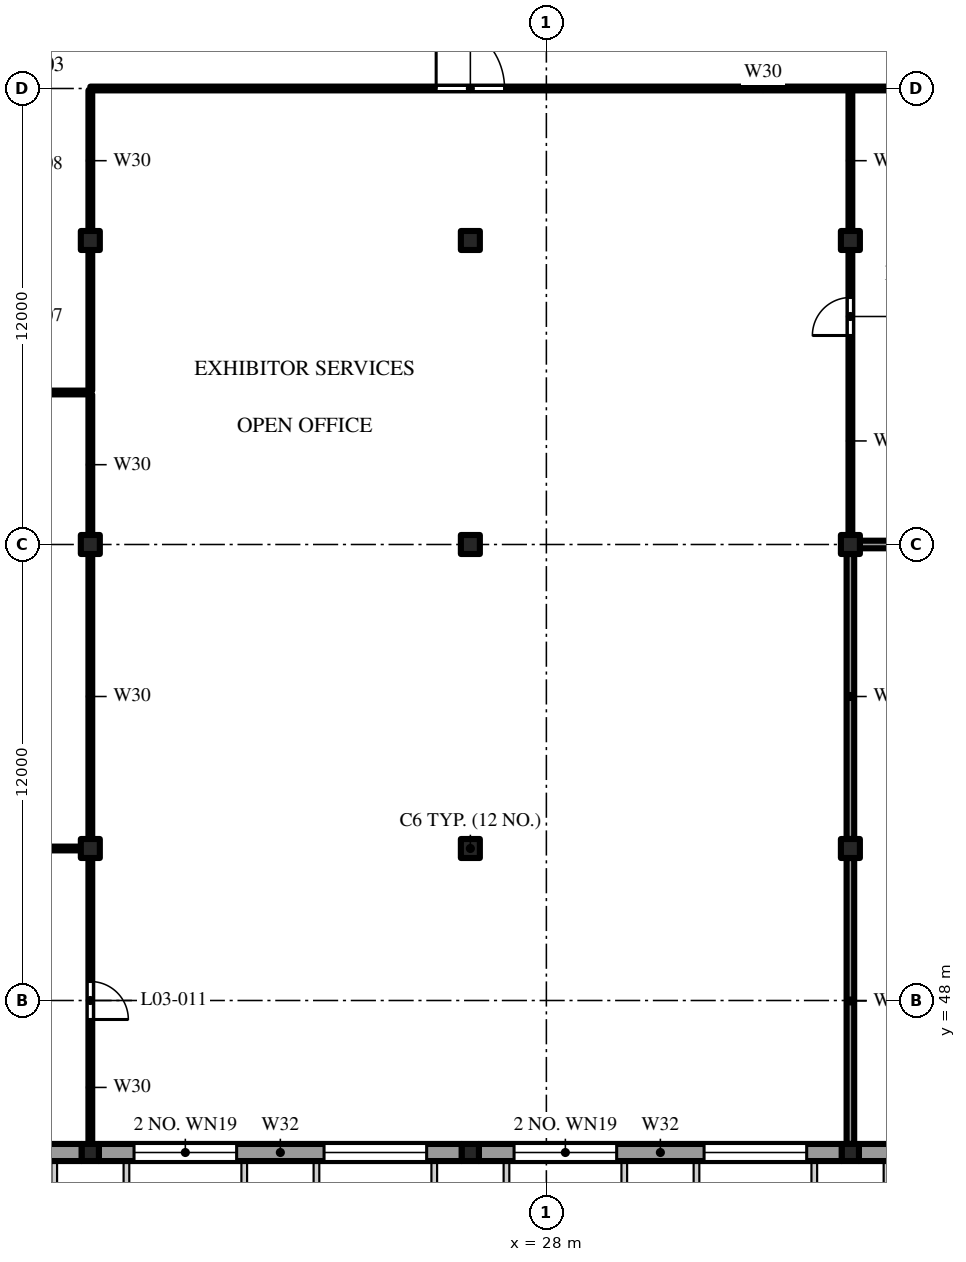
"""IFC4 building model, lengths in metres.
Left out: names, types, materials, properties, quantities, classifications, styles, units other than length and angle.
Written with IfcOpenShell. Run it as: python <this file> out.ifc"""

import sys

from ifc_helpers import new_model, si_unit, direction, frame, frame_2d, origin, origin_2d, place, context, subcontext, project, spatial, polyline, rectangle, outline, extrude, element, fill, save


model = new_model("IFC4")
c1 = context("Model", 3, precision=1e-05, world=origin(), true_north=direction((0.0, 1.0)))
c2 = subcontext(c1, "Body", "Model", "MODEL_VIEW")
j1 = project(units=[si_unit("LENGTHUNIT", "METRE"), si_unit("PLANEANGLEUNIT", "RADIAN")], contexts=[c1])
p1 = place(None, origin())
s1 = spatial("IfcSite", under=j1, at=p1, CompositionType="ELEMENT")
p2 = place(p1, origin())
s2 = spatial("IfcBuilding", under=s1, at=p2, CompositionType="ELEMENT")
p3 = place(p2, frame((0.0, 0.0, 16.8)))
s3 = spatial("IfcBuildingStorey", under=s2, at=p3, CompositionType="ELEMENT", Elevation=16.8)
p4 = place(p3, frame((16.0, 44.0, 0.0), z_axis=(0.0, 0.0, 1.0), x_axis=(1.0, 0.0, 0.0)))
e1 = element("IfcColumn", 1, at=p4, inside=s3, PredefinedType="COLUMN", context=c2, shape_type="SweptSolid", body=[
    extrude(rectangle(XDim=0.45, YDim=0.45, at=origin_2d()), origin(), (0.0, 0.0, 1.0), 3.691),
])
for number, where, z_axis, x_axis in (
    (2, (16.0, 52.0, 0.0), (0.0, 0.0, 1.0), (1.0, 0.0, 0.0)),
    (3, (16.0, 60.0, 0.0), (0.0, 0.0, 1.0), (1.0, 0.0, 0.0)),
    (4, (16.0, 68.0, 0.0), (0.0, 0.0, 1.0), (1.0, 0.0, 0.0)),
):
    element("IfcColumn", number, at=place(p3, frame(where, z_axis=z_axis, x_axis=x_axis)), inside=s3, PredefinedType="COLUMN", context=c2, shape_type="SweptSolid", body=[
        extrude(rectangle(XDim=0.5, YDim=0.5, at=origin_2d()), origin(), (0.0, 0.0, 1.0), 4.8),
    ])
p5 = place(p3, frame((26.0, 44.0, 0.0), z_axis=(0.0, 0.0, 1.0), x_axis=(1.0, 0.0, 0.0)))
e5 = element("IfcColumn", 5, at=p5, inside=s3, PredefinedType="COLUMN", context=c2, shape_type="SweptSolid", body=[
    extrude(rectangle(XDim=0.45, YDim=0.45, at=origin_2d()), origin(), (0.0, 0.0, 1.0), 3.691),
])
for number, where, z_axis, x_axis in (
    (6, (26.0, 52.0, 0.0), (0.0, 0.0, 1.0), (1.0, 0.0, 0.0)),
    (7, (26.0, 60.0, 0.0), (0.0, 0.0, 1.0), (1.0, 0.0, 0.0)),
    (8, (26.0, 68.0, 0.0), (0.0, 0.0, 1.0), (1.0, 0.0, 0.0)),
):
    element("IfcColumn", number, at=place(p3, frame(where, z_axis=z_axis, x_axis=x_axis)), inside=s3, PredefinedType="COLUMN", context=c2, shape_type="SweptSolid", body=[
        extrude(rectangle(XDim=0.5, YDim=0.5, at=origin_2d()), origin(), (0.0, 0.0, 1.0), 4.8),
    ])
p6 = place(p3, frame((36.0, 44.0, 0.0), z_axis=(0.0, 0.0, 1.0), x_axis=(1.0, 0.0, 0.0)))
e9 = element("IfcColumn", 9, at=p6, inside=s3, PredefinedType="COLUMN", context=c2, shape_type="SweptSolid", body=[
    extrude(rectangle(XDim=0.45, YDim=0.45, at=origin_2d()), origin(), (0.0, 0.0, 1.0), 3.691),
])
for number, where, z_axis, x_axis in (
    (10, (36.0, 52.0, 0.0), (0.0, 0.0, 1.0), (1.0, 0.0, 0.0)),
    (11, (36.0, 60.0, 0.0), (0.0, 0.0, 1.0), (1.0, 0.0, 0.0)),
    (12, (36.0, 68.0, 0.0), (0.0, 0.0, 1.0), (1.0, 0.0, 0.0)),
):
    element("IfcColumn", number, at=place(p3, frame(where, z_axis=z_axis, x_axis=x_axis)), inside=s3, PredefinedType="COLUMN", context=c2, shape_type="SweptSolid", body=[
        extrude(rectangle(XDim=0.5, YDim=0.5, at=origin_2d()), origin(), (0.0, 0.0, 1.0), 4.8),
    ])
p7 = place(p3, frame((6.225, 44.0, 0.0), z_axis=(0.0, 0.0, 1.0), x_axis=(1.0, 0.0, 0.0)))
e13 = element("IfcWall", 13, at=p7, inside=s3, PredefinedType="SOLIDWALL", context=c2, shape_type="SweptSolid", body=[
    extrude(rectangle(XDim=9.55, YDim=0.45, at=frame_2d((4.775, 0.0))), origin(), (0.0, 0.0, 1.0), 3.541),
])
p8 = place(p7, frame((0.925, 0.0, 0.8)))
e14 = element("IfcOpeningElement", 14, at=p8, cuts=e13, PredefinedType="OPENING", context=c2, shape_type="SweptSolid", body=[
    extrude(rectangle(XDim=2.7, YDim=2.4, at=frame_2d((1.35, 1.2))), frame((0.0, 0.235, 0.0), z_axis=(0.0, -1.0, 0.0), x_axis=(1.0, 0.0, 0.0)), (0.0, 0.0, 1.0), 0.47),
])
p9 = place(p7, frame((5.925, 0.0, 0.8)))
e15 = element("IfcOpeningElement", 15, at=p9, cuts=e13, PredefinedType="OPENING", context=c2, shape_type="SweptSolid", body=[
    extrude(rectangle(XDim=2.7, YDim=2.4, at=frame_2d((1.35, 1.2))), frame((0.0, 0.235, 0.0), z_axis=(0.0, -1.0, 0.0), x_axis=(1.0, 0.0, 0.0)), (0.0, 0.0, 1.0), 0.47),
])
p10 = place(p3, frame((16.225, 44.0, 0.0), z_axis=(0.0, 0.0, 1.0), x_axis=(1.0, 0.0, 0.0)))
e16 = element("IfcWall", 16, at=p10, inside=s3, PredefinedType="SOLIDWALL", context=c2, shape_type="SweptSolid", body=[
    extrude(rectangle(XDim=9.55, YDim=0.45, at=frame_2d((4.775, 0.0))), origin(), (0.0, 0.0, 1.0), 3.541),
])
p11 = place(p10, frame((0.925, 0.0, 0.8)))
e17 = element("IfcOpeningElement", 17, at=p11, cuts=e16, PredefinedType="OPENING", context=c2, shape_type="SweptSolid", body=[
    extrude(rectangle(XDim=2.7, YDim=2.4, at=frame_2d((1.35, 1.2))), frame((0.0, 0.235, 0.0), z_axis=(0.0, -1.0, 0.0), x_axis=(1.0, 0.0, 0.0)), (0.0, 0.0, 1.0), 0.47),
])
p12 = place(p10, frame((5.925, 0.0, 0.8)))
e18 = element("IfcOpeningElement", 18, at=p12, cuts=e16, PredefinedType="OPENING", context=c2, shape_type="SweptSolid", body=[
    extrude(rectangle(XDim=2.7, YDim=2.4, at=frame_2d((1.35, 1.2))), frame((0.0, 0.235, 0.0), z_axis=(0.0, -1.0, 0.0), x_axis=(1.0, 0.0, 0.0)), (0.0, 0.0, 1.0), 0.47),
])
p13 = place(p3, frame((26.225, 44.0, 0.0), z_axis=(0.0, 0.0, 1.0), x_axis=(1.0, 0.0, 0.0)))
e19 = element("IfcWall", 19, at=p13, inside=s3, PredefinedType="SOLIDWALL", context=c2, shape_type="SweptSolid", body=[
    extrude(rectangle(XDim=9.55, YDim=0.45, at=frame_2d((4.775, 0.0))), origin(), (0.0, 0.0, 1.0), 3.541),
])
p14 = place(p13, frame((0.925, 0.0, 0.8)))
e20 = element("IfcOpeningElement", 20, at=p14, cuts=e19, PredefinedType="OPENING", context=c2, shape_type="SweptSolid", body=[
    extrude(rectangle(XDim=2.7, YDim=2.4, at=frame_2d((1.35, 1.2))), frame((0.0, 0.235, 0.0), z_axis=(0.0, -1.0, 0.0), x_axis=(1.0, 0.0, 0.0)), (0.0, 0.0, 1.0), 0.47),
])
p15 = place(p13, frame((5.925, 0.0, 0.8)))
e21 = element("IfcOpeningElement", 21, at=p15, cuts=e19, PredefinedType="OPENING", context=c2, shape_type="SweptSolid", body=[
    extrude(rectangle(XDim=2.7, YDim=2.4, at=frame_2d((1.35, 1.2))), frame((0.0, 0.235, 0.0), z_axis=(0.0, -1.0, 0.0), x_axis=(1.0, 0.0, 0.0)), (0.0, 0.0, 1.0), 0.47),
])
p16 = place(p3, frame((36.225, 44.0, 0.0), z_axis=(0.0, 0.0, 1.0), x_axis=(1.0, 0.0, 0.0)))
e22 = element("IfcWall", 22, at=p16, inside=s3, PredefinedType="SOLIDWALL", context=c2, shape_type="SweptSolid", body=[
    extrude(rectangle(XDim=9.55, YDim=0.45, at=frame_2d((4.775, 0.0))), origin(), (0.0, 0.0, 1.0), 3.541),
])
p17 = place(p16, frame((0.925, 0.0, 0.8)))
e23 = element("IfcOpeningElement", 23, at=p17, cuts=e22, PredefinedType="OPENING", context=c2, shape_type="SweptSolid", body=[
    extrude(rectangle(XDim=2.7, YDim=2.4, at=frame_2d((1.35, 1.2))), frame((0.0, 0.235, 0.0), z_axis=(0.0, -1.0, 0.0), x_axis=(1.0, 0.0, 0.0)), (0.0, 0.0, 1.0), 0.47),
])
p18 = place(p16, frame((5.925, 0.0, 0.8)))
e24 = element("IfcOpeningElement", 24, at=p18, cuts=e22, PredefinedType="OPENING", context=c2, shape_type="SweptSolid", body=[
    extrude(rectangle(XDim=2.7, YDim=2.4, at=frame_2d((1.35, 1.2))), frame((0.0, 0.235, 0.0), z_axis=(0.0, -1.0, 0.0), x_axis=(1.0, 0.0, 0.0)), (0.0, 0.0, 1.0), 0.47),
])
p19 = place(p3, frame((6.225, 52.0, 0.0), z_axis=(0.0, 0.0, 1.0), x_axis=(1.0, 0.0, 0.0)))
e25 = element("IfcWall", 25, at=p19, inside=s3, PredefinedType="PARTITIONING", context=c2, shape_type="SweptSolid", body=[
    extrude(rectangle(XDim=9.525, YDim=0.1, at=frame_2d((4.762, 0.0))), origin(), (0.0, 0.0, 1.0), 5.241),
])
p20 = place(p3, frame((36.25, 60.0, 0.0), z_axis=(0.0, 0.0, 1.0), x_axis=(1.0, 0.0, 0.0)))
e26 = element("IfcWall", 26, at=p20, inside=s3, PredefinedType="SOLIDWALL", context=c2, shape_type="SweptSolid", body=[
    extrude(rectangle(XDim=9.525, YDim=0.2, at=frame_2d((4.762, 0.0))), origin(), (0.0, 0.0, 1.0), 6.942),
])
p21 = place(p20, frame((4.25, 0.0, 0.0)))
e27 = element("IfcOpeningElement", 27, at=p21, cuts=e26, PredefinedType="OPENING", context=c2, shape_type="SweptSolid", body=[
    extrude(rectangle(XDim=1.0, YDim=2.1, at=frame_2d((0.5, 1.05))), frame((0.0, 0.11, 0.0), z_axis=(0.0, -1.0, 0.0), x_axis=(1.0, 0.0, 0.0)), (0.0, 0.0, 1.0), 0.22),
])
p22 = place(p3, frame((12.2, 64.0, 0.0), z_axis=(0.0, 0.0, 1.0), x_axis=(1.0, 0.0, 0.0)))
e28 = element("IfcWall", 28, at=p22, inside=s3, PredefinedType="PARTITIONING", context=c2, shape_type="SweptSolid", body=[
    extrude(rectangle(XDim=3.8, YDim=0.1, at=frame_2d((1.9, 0.0))), origin(), (0.0, 0.0, 1.0), 7.792),
])
p23 = place(p22, frame((1.4, 0.0, 0.0)))
e29 = element("IfcOpeningElement", 29, at=p23, cuts=e28, PredefinedType="OPENING", context=c2, shape_type="SweptSolid", body=[
    extrude(rectangle(XDim=1.0, YDim=2.1, at=frame_2d((0.5, 1.05))), frame((0.0, 0.06, 0.0), z_axis=(0.0, -1.0, 0.0), x_axis=(1.0, 0.0, 0.0)), (0.0, 0.0, 1.0), 0.12),
])
p24 = place(p3, frame((16.0, 72.0, 0.0), z_axis=(0.0, 0.0, 1.0), x_axis=(1.0, 0.0, 0.0)))
e30 = element("IfcWall", 30, at=p24, inside=s3, PredefinedType="PARTITIONING", context=c2, shape_type="SweptSolid", body=[
    extrude(rectangle(XDim=29.775, YDim=0.1, at=frame_2d((14.887, 0.0))), origin(), (0.0, 0.0, 1.0), 9.493),
])
p25 = place(p24, frame((9.1, 0.0, 0.0)))
e31 = element("IfcOpeningElement", 31, at=p25, cuts=e30, PredefinedType="OPENING", context=c2, shape_type="SweptSolid", body=[
    extrude(rectangle(XDim=1.8, YDim=2.1, at=frame_2d((0.9, 1.05))), frame((0.0, 0.06, 0.0), z_axis=(0.0, -1.0, 0.0), x_axis=(1.0, 0.0, 0.0)), (0.0, 0.0, 1.0), 0.12),
])
p26 = place(p24, frame((24.5, 0.0, 0.0)))
e32 = element("IfcOpeningElement", 32, at=p26, cuts=e30, PredefinedType="OPENING", context=c2, shape_type="SweptSolid", body=[
    extrude(rectangle(XDim=1.0, YDim=2.1, at=frame_2d((0.5, 1.05))), frame((0.0, 0.06, 0.0), z_axis=(0.0, -1.0, 0.0), x_axis=(1.0, 0.0, 0.0)), (0.0, 0.0, 1.0), 0.12),
])
p27 = place(p3, frame((16.0, 44.225, 0.0), z_axis=(0.0, 0.0, 1.0), x_axis=(0.0, 1.0, 0.0)))
e33 = element("IfcWall", 33, at=p27, inside=s3, PredefinedType="PARTITIONING", context=c2, shape_type="SweptSolid", body=[
    extrude(outline(polyline([(0.0, 0.0), (7.525, 0.0), (7.525, 5.188), (0.0, 3.589), (0.0, 0.0)])), frame((0.0, 0.05, 0.0), z_axis=(0.0, -1.0, 0.0), x_axis=(1.0, 0.0, 0.0)), (0.0, 0.0, 1.0), 0.1),
])
p28 = place(p27, frame((3.275, 0.0, 0.0)))
e34 = element("IfcOpeningElement", 34, at=p28, cuts=e33, PredefinedType="OPENING", context=c2, shape_type="SweptSolid", body=[
    extrude(rectangle(XDim=1.0, YDim=2.1, at=frame_2d((0.5, 1.05))), frame((0.0, 0.06, 0.0), z_axis=(0.0, -1.0, 0.0), x_axis=(1.0, 0.0, 0.0)), (0.0, 0.0, 1.0), 0.12),
])
p29 = place(p3, frame((16.0, 52.25, 0.0), z_axis=(0.0, 0.0, 1.0), x_axis=(0.0, 1.0, 0.0)))
e35 = element("IfcWall", 35, at=p29, inside=s3, PredefinedType="PARTITIONING", context=c2, shape_type="SweptSolid", body=[
    extrude(outline(polyline([(0.0, 0.0), (7.5, 0.0), (7.5, 6.889), (0.0, 5.295), (0.0, 0.0)])), frame((0.0, 0.05, 0.0), z_axis=(0.0, -1.0, 0.0), x_axis=(1.0, 0.0, 0.0)), (0.0, 0.0, 1.0), 0.1),
])
p30 = place(p3, frame((16.0, 60.25, 0.0), z_axis=(0.0, 0.0, 1.0), x_axis=(0.0, 1.0, 0.0)))
e36 = element("IfcWall", 36, at=p30, inside=s3, PredefinedType="PARTITIONING", context=c2, shape_type="SweptSolid", body=[
    extrude(outline(polyline([(0.0, 0.0), (3.7, 0.0), (3.7, 7.781), (0.0, 6.995), (0.0, 0.0)])), frame((0.0, 0.05, 0.0), z_axis=(0.0, -1.0, 0.0), x_axis=(1.0, 0.0, 0.0)), (0.0, 0.0, 1.0), 0.1),
])
p31 = place(p3, frame((16.0, 64.05, 0.0), z_axis=(0.0, 0.0, 1.0), x_axis=(0.0, 1.0, 0.0)))
e37 = element("IfcWall", 37, at=p31, inside=s3, PredefinedType="PARTITIONING", context=c2, shape_type="SweptSolid", body=[
    extrude(outline(polyline([(0.0, 0.0), (3.7, 0.0), (3.7, 8.589), (0.0, 7.803), (0.0, 0.0)])), frame((0.0, 0.05, 0.0), z_axis=(0.0, -1.0, 0.0), x_axis=(1.0, 0.0, 0.0)), (0.0, 0.0, 1.0), 0.1),
])
p32 = place(p3, frame((16.0, 68.25, 0.0), z_axis=(0.0, 0.0, 1.0), x_axis=(0.0, 1.0, 0.0)))
e38 = element("IfcWall", 38, at=p32, inside=s3, PredefinedType="PARTITIONING", context=c2, shape_type="SweptSolid", body=[
    extrude(outline(polyline([(0.0, 0.0), (3.7, 0.0), (3.7, 9.482), (0.0, 8.696), (0.0, 0.0)])), frame((0.0, 0.05, 0.0), z_axis=(0.0, -1.0, 0.0), x_axis=(1.0, 0.0, 0.0)), (0.0, 0.0, 1.0), 0.1),
])
p33 = place(p3, frame((36.0, 44.225, 0.0), z_axis=(0.0, 0.0, 1.0), x_axis=(0.0, 1.0, 0.0)))
e39 = element("IfcWall", 39, at=p33, inside=s3, PredefinedType="SOLIDWALL", context=c2, shape_type="SweptSolid", body=[
    extrude(outline(polyline([(0.0, 0.0), (7.525, 0.0), (7.525, 5.188), (0.0, 3.589), (0.0, 0.0)])), frame((0.0, 0.1, 0.0), z_axis=(0.0, -1.0, 0.0), x_axis=(1.0, 0.0, 0.0)), (0.0, 0.0, 1.0), 0.2),
])
p34 = place(p3, frame((36.0, 52.25, 0.0), z_axis=(0.0, 0.0, 1.0), x_axis=(0.0, 1.0, 0.0)))
e40 = element("IfcWall", 40, at=p34, inside=s3, PredefinedType="SOLIDWALL", context=c2, shape_type="SweptSolid", body=[
    extrude(outline(polyline([(0.0, 0.0), (7.5, 0.0), (7.5, 6.889), (0.0, 5.295), (0.0, 0.0)])), frame((0.0, 0.1, 0.0), z_axis=(0.0, -1.0, 0.0), x_axis=(1.0, 0.0, 0.0)), (0.0, 0.0, 1.0), 0.2),
])
p35 = place(p3, frame((36.0, 60.25, 0.0), z_axis=(0.0, 0.0, 1.0), x_axis=(0.0, 1.0, 0.0)))
e41 = element("IfcWall", 41, at=p35, inside=s3, PredefinedType="PARTITIONING", context=c2, shape_type="SweptSolid", body=[
    extrude(outline(polyline([(0.0, 0.0), (7.5, 0.0), (7.5, 8.589), (0.0, 6.995), (0.0, 0.0)])), frame((0.0, 0.05, 0.0), z_axis=(0.0, -1.0, 0.0), x_axis=(1.0, 0.0, 0.0)), (0.0, 0.0, 1.0), 0.1),
])
p36 = place(p35, frame((5.25, 0.0, 0.0)))
e42 = element("IfcOpeningElement", 42, at=p36, cuts=e41, PredefinedType="OPENING", context=c2, shape_type="SweptSolid", body=[
    extrude(rectangle(XDim=1.0, YDim=2.1, at=frame_2d((0.5, 1.05))), frame((0.0, 0.06, 0.0), z_axis=(0.0, -1.0, 0.0), x_axis=(1.0, 0.0, 0.0)), (0.0, 0.0, 1.0), 0.12),
])
p37 = place(p3, frame((36.0, 68.25, 0.0), z_axis=(0.0, 0.0, 1.0), x_axis=(0.0, 1.0, 0.0)))
e43 = element("IfcWall", 43, at=p37, inside=s3, PredefinedType="PARTITIONING", context=c2, shape_type="SweptSolid", body=[
    extrude(outline(polyline([(0.0, 0.0), (3.7, 0.0), (3.7, 9.482), (0.0, 8.696), (0.0, 0.0)])), frame((0.0, 0.05, 0.0), z_axis=(0.0, -1.0, 0.0), x_axis=(1.0, 0.0, 0.0)), (0.0, 0.0, 1.0), 0.1),
])
p38 = place(p28, frame((1.0, 0.0, 0.0), z_axis=(0.0, 0.0, 1.0), x_axis=(-1.0, 0.0, 0.0)))
e44 = element("IfcDoor", 44, at=p38, inside=s3, OperationType="SINGLE_SWING_RIGHT", PredefinedType="DOOR", context=c2, shape_type="SweptSolid", body=[
    extrude(rectangle(XDim=1.0, YDim=2.1, at=frame_2d((0.5, 1.05))), frame((0.0, 0.025, 0.0), z_axis=(0.0, -1.0, 0.0), x_axis=(1.0, 0.0, 0.0)), (0.0, 0.0, 1.0), 0.05),
])
fill(e34, e44)
p39 = place(p25, origin())
e45 = element("IfcDoor", 45, at=p39, inside=s3, OperationType="DOUBLE_DOOR_SINGLE_SWING", PredefinedType="DOOR", context=c2, shape_type="SweptSolid", body=[
    extrude(rectangle(XDim=1.8, YDim=2.1, at=frame_2d((0.9, 1.05))), frame((0.0, 0.025, 0.0), z_axis=(0.0, -1.0, 0.0), x_axis=(1.0, 0.0, 0.0)), (0.0, 0.0, 1.0), 0.05),
])
fill(e31, e45)
p40 = place(p36, origin())
e46 = element("IfcDoor", 46, at=p40, inside=s3, OperationType="SINGLE_SWING_LEFT", PredefinedType="DOOR", context=c2, shape_type="SweptSolid", body=[
    extrude(rectangle(XDim=1.0, YDim=2.1, at=frame_2d((0.5, 1.05))), frame((0.0, 0.025, 0.0), z_axis=(0.0, -1.0, 0.0), x_axis=(1.0, 0.0, 0.0)), (0.0, 0.0, 1.0), 0.05),
])
fill(e42, e46)
p41 = place(p11, origin())
e47 = element("IfcWindow", 47, at=p41, inside=s3, PartitioningType="SINGLE_PANEL", PredefinedType="WINDOW", context=c2, shape_type="SweptSolid", body=[
    extrude(rectangle(XDim=2.7, YDim=2.4, at=frame_2d((1.35, 1.2))), frame((0.0, 0.215, 0.0), z_axis=(0.0, -1.0, 0.0), x_axis=(1.0, 0.0, 0.0)), (0.0, 0.0, 1.0), 0.06),
])
fill(e17, e47)
p42 = place(p12, origin())
e48 = element("IfcWindow", 48, at=p42, inside=s3, PartitioningType="SINGLE_PANEL", PredefinedType="WINDOW", context=c2, shape_type="SweptSolid", body=[
    extrude(rectangle(XDim=2.7, YDim=2.4, at=frame_2d((1.35, 1.2))), frame((0.0, 0.215, 0.0), z_axis=(0.0, -1.0, 0.0), x_axis=(1.0, 0.0, 0.0)), (0.0, 0.0, 1.0), 0.06),
])
fill(e18, e48)
p43 = place(p14, origin())
e49 = element("IfcWindow", 49, at=p43, inside=s3, PartitioningType="SINGLE_PANEL", PredefinedType="WINDOW", context=c2, shape_type="SweptSolid", body=[
    extrude(rectangle(XDim=2.7, YDim=2.4, at=frame_2d((1.35, 1.2))), frame((0.0, 0.215, 0.0), z_axis=(0.0, -1.0, 0.0), x_axis=(1.0, 0.0, 0.0)), (0.0, 0.0, 1.0), 0.06),
])
fill(e20, e49)
p44 = place(p15, origin())
e50 = element("IfcWindow", 50, at=p44, inside=s3, PartitioningType="SINGLE_PANEL", PredefinedType="WINDOW", context=c2, shape_type="SweptSolid", body=[
    extrude(rectangle(XDim=2.7, YDim=2.4, at=frame_2d((1.35, 1.2))), frame((0.0, 0.215, 0.0), z_axis=(0.0, -1.0, 0.0), x_axis=(1.0, 0.0, 0.0)), (0.0, 0.0, 1.0), 0.06),
])
fill(e21, e50)
save(model, sys.argv[1])
